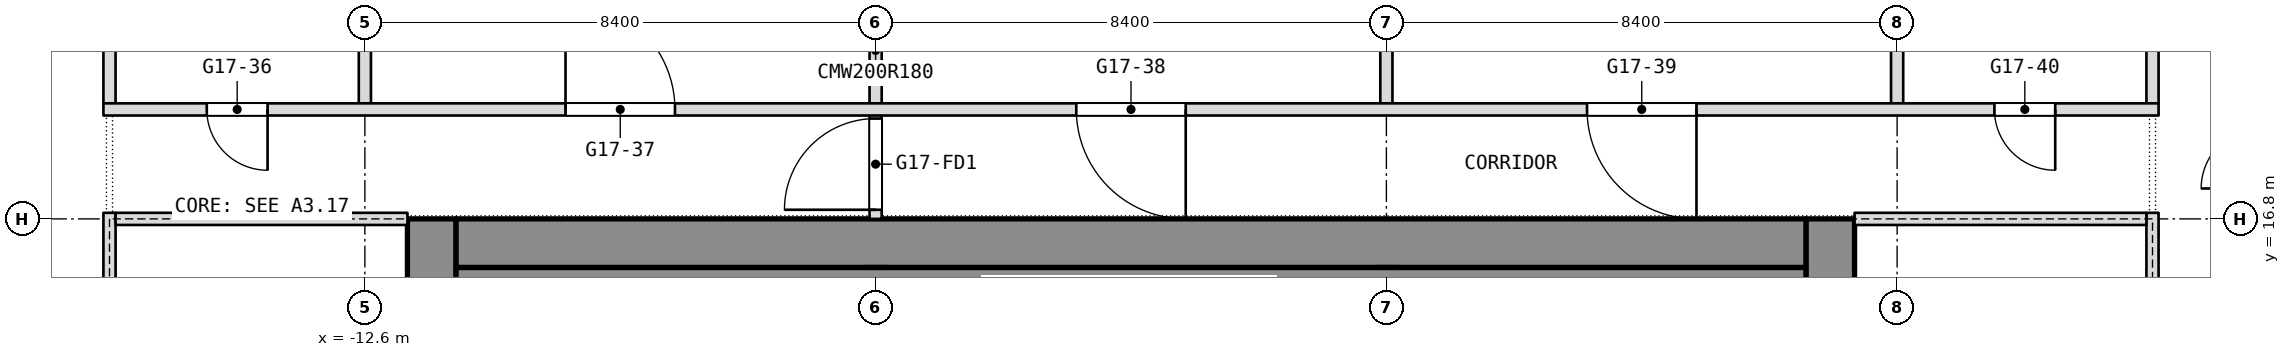
"""IFC4 building model, lengths in metres.
Left out: names, types, materials, properties, quantities, classifications, styles, units other than length and angle.
Written with IfcOpenShell. Run it as: python <this file> out.ifc"""

import sys

from ifc_helpers import new_model, si_unit, direction, frame, frame_2d, origin, place, context, subcontext, project, spatial, rectangle, extrude, element, fill, save


model = new_model("IFC4")
c1 = context("Model", 3, precision=1e-05, world=origin(), true_north=direction((0.0, 1.0)))
c2 = subcontext(c1, "Body", "Model", "MODEL_VIEW")
j1 = project(units=[si_unit("LENGTHUNIT", "METRE"), si_unit("PLANEANGLEUNIT", "RADIAN")], contexts=[c1])
p1 = place(None, origin())
s1 = spatial("IfcSite", under=j1, at=p1, CompositionType="ELEMENT")
p2 = place(p1, origin())
s2 = spatial("IfcBuilding", under=s1, at=p2, CompositionType="ELEMENT")
p3 = place(p2, frame((0.0, 0.0, 212.9)))
s3 = spatial("IfcBuildingStorey", under=s2, at=p3, CompositionType="ELEMENT", Elevation=212.9)
p4 = place(p3, frame((11.5, 0.0, 0.0), z_axis=(0.0, 0.0, 1.0), x_axis=(0.0, 1.0, 0.0)))
e1 = element("IfcWall", 1, at=p4, inside=s3, PredefinedType="SHEAR", context=c2, shape_type="SweptSolid", body=[
    extrude(rectangle(XDim=16.8, YDim=0.8, at=frame_2d((8.4, 0.0))), origin(), (0.0, 0.0, 1.0), 3.6),
])
p5 = place(p4, frame((2.3, 0.0, 0.0)))
e2 = element("IfcOpeningElement", 2, at=p5, cuts=e1, PredefinedType="OPENING", context=c2, shape_type="SweptSolid", body=[
    extrude(rectangle(XDim=1.1, YDim=2.1, at=frame_2d((0.55, 1.05))), frame((0.0, 0.4, 0.0), z_axis=(0.0, -1.0, 0.0), x_axis=(1.0, 0.0, 0.0)), (0.0, 0.0, 1.0), 0.8),
])
p6 = place(p4, frame((4.85, 0.0, 0.0)))
e3 = element("IfcOpeningElement", 3, at=p6, cuts=e1, PredefinedType="OPENING", context=c2, shape_type="SweptSolid", body=[
    extrude(rectangle(XDim=1.1, YDim=2.1, at=frame_2d((0.55, 1.05))), frame((0.0, 0.4, 0.0), z_axis=(0.0, -1.0, 0.0), x_axis=(1.0, 0.0, 0.0)), (0.0, 0.0, 1.0), 0.8),
])
p7 = place(p4, frame((6.825, 0.0, 0.0)))
e4 = element("IfcOpeningElement", 4, at=p7, cuts=e1, PredefinedType="OPENING", context=c2, shape_type="SweptSolid", body=[
    extrude(rectangle(XDim=1.2, YDim=2.1, at=frame_2d((0.6, 1.05))), frame((0.0, 0.4, 0.0), z_axis=(0.0, -1.0, 0.0), x_axis=(1.0, 0.0, 0.0)), (0.0, 0.0, 1.0), 0.8),
])
p8 = place(p4, frame((13.4, 0.0, 0.0)))
e5 = element("IfcOpeningElement", 5, at=p8, cuts=e1, PredefinedType="OPENING", context=c2, shape_type="SweptSolid", body=[
    extrude(rectangle(XDim=1.1, YDim=2.1, at=frame_2d((0.55, 1.05))), frame((0.0, 0.4, 0.0), z_axis=(0.0, -1.0, 0.0), x_axis=(1.0, 0.0, 0.0)), (0.0, 0.0, 1.0), 0.8),
])
p9 = place(p4, frame((10.85, 0.0, 0.0)))
e6 = element("IfcOpeningElement", 6, at=p9, cuts=e1, PredefinedType="OPENING", context=c2, shape_type="SweptSolid", body=[
    extrude(rectangle(XDim=1.1, YDim=2.1, at=frame_2d((0.55, 1.05))), frame((0.0, 0.4, 0.0), z_axis=(0.0, -1.0, 0.0), x_axis=(1.0, 0.0, 0.0)), (0.0, 0.0, 1.0), 0.8),
])
p10 = place(p4, frame((8.775, 0.0, 0.0)))
e7 = element("IfcOpeningElement", 7, at=p10, cuts=e1, PredefinedType="OPENING", context=c2, shape_type="SweptSolid", body=[
    extrude(rectangle(XDim=1.2, YDim=2.1, at=frame_2d((0.6, 1.05))), frame((0.0, 0.4, 0.0), z_axis=(0.0, -1.0, 0.0), x_axis=(1.0, 0.0, 0.0)), (0.0, 0.0, 1.0), 0.8),
])
p11 = place(p3, frame((-11.5, 0.0, 0.0), z_axis=(0.0, 0.0, 1.0), x_axis=(0.0, 1.0, 0.0)))
e8 = element("IfcWall", 8, at=p11, inside=s3, PredefinedType="SHEAR", context=c2, shape_type="SweptSolid", body=[
    extrude(rectangle(XDim=16.8, YDim=0.8, at=frame_2d((8.4, 0.0))), origin(), (0.0, 0.0, 1.0), 3.6),
])
p12 = place(p11, frame((1.762, 0.0, 0.0)))
e9 = element("IfcOpeningElement", 9, at=p12, cuts=e8, PredefinedType="OPENING", context=c2, shape_type="SweptSolid", body=[
    extrude(rectangle(XDim=0.9, YDim=2.1, at=frame_2d((0.45, 1.05))), frame((0.0, 0.4, 0.0), z_axis=(0.0, -1.0, 0.0), x_axis=(1.0, 0.0, 0.0)), (0.0, 0.0, 1.0), 0.8),
])
p13 = place(p11, frame((4.387, 0.0, 0.0)))
e10 = element("IfcOpeningElement", 10, at=p13, cuts=e8, PredefinedType="OPENING", context=c2, shape_type="SweptSolid", body=[
    extrude(rectangle(XDim=0.9, YDim=2.1, at=frame_2d((0.45, 1.05))), frame((0.0, 0.4, 0.0), z_axis=(0.0, -1.0, 0.0), x_axis=(1.0, 0.0, 0.0)), (0.0, 0.0, 1.0), 0.8),
])
p14 = place(p11, frame((6.825, 0.0, 0.0)))
e11 = element("IfcOpeningElement", 11, at=p14, cuts=e8, PredefinedType="OPENING", context=c2, shape_type="SweptSolid", body=[
    extrude(rectangle(XDim=1.2, YDim=2.1, at=frame_2d((0.6, 1.05))), frame((0.0, 0.4, 0.0), z_axis=(0.0, -1.0, 0.0), x_axis=(1.0, 0.0, 0.0)), (0.0, 0.0, 1.0), 0.8),
])
p15 = place(p11, frame((12.3, 0.0, 0.0)))
e12 = element("IfcOpeningElement", 12, at=p15, cuts=e8, PredefinedType="OPENING", context=c2, shape_type="SweptSolid", body=[
    extrude(rectangle(XDim=0.9, YDim=2.1, at=frame_2d((0.45, 1.05))), frame((0.0, 0.4, 0.0), z_axis=(0.0, -1.0, 0.0), x_axis=(1.0, 0.0, 0.0)), (0.0, 0.0, 1.0), 0.8),
])
p16 = place(p11, frame((8.775, 0.0, 0.0)))
e13 = element("IfcOpeningElement", 13, at=p16, cuts=e8, PredefinedType="OPENING", context=c2, shape_type="SweptSolid", body=[
    extrude(rectangle(XDim=1.2, YDim=2.1, at=frame_2d((0.6, 1.05))), frame((0.0, 0.4, 0.0), z_axis=(0.0, -1.0, 0.0), x_axis=(1.0, 0.0, 0.0)), (0.0, 0.0, 1.0), 0.8),
])
p17 = place(p3, frame((-11.1, 16.4, 0.0), z_axis=(0.0, 0.0, 1.0), x_axis=(1.0, 0.0, 0.0)))
e14 = element("IfcWall", 14, at=p17, inside=s3, PredefinedType="SHEAR", context=c2, shape_type="SweptSolid", body=[
    extrude(rectangle(XDim=22.2, YDim=0.8, at=frame_2d((11.1, 0.0))), origin(), (0.0, 0.0, 1.0), 3.6),
])
p18 = place(p3, frame((-4.2, 0.8, 0.0), z_axis=(0.0, 0.0, 1.0), x_axis=(0.0, 1.0, 0.0)))
e15 = element("IfcWall", 15, at=p18, inside=s3, PredefinedType="SHEAR", context=c2, shape_type="SweptSolid", body=[
    extrude(rectangle(XDim=15.2, YDim=0.4, at=frame_2d((7.6, 0.0))), origin(), (0.0, 0.0, 1.0), 3.6),
])
p19 = place(p18, frame((8.5, 0.0, 0.0)))
e16 = element("IfcOpeningElement", 16, at=p19, cuts=e15, PredefinedType="OPENING", context=c2, shape_type="SweptSolid", body=[
    extrude(rectangle(XDim=1.2, YDim=2.1, at=frame_2d((0.6, 1.05))), frame((0.0, 0.2, 0.0), z_axis=(0.0, -1.0, 0.0), x_axis=(1.0, 0.0, 0.0)), (0.0, 0.0, 1.0), 0.4),
])
p20 = place(p3, frame((4.2, 0.8, 0.0), z_axis=(0.0, 0.0, 1.0), x_axis=(0.0, 1.0, 0.0)))
e17 = element("IfcWall", 17, at=p20, inside=s3, PredefinedType="SHEAR", context=c2, shape_type="SweptSolid", body=[
    extrude(rectangle(XDim=15.2, YDim=0.4, at=frame_2d((7.6, 0.0))), origin(), (0.0, 0.0, 1.0), 3.6),
])
p21 = place(p20, frame((5.95, 0.0, 0.0)))
e18 = element("IfcOpeningElement", 18, at=p21, cuts=e17, PredefinedType="OPENING", context=c2, shape_type="SweptSolid", body=[
    extrude(rectangle(XDim=1.2, YDim=2.1, at=frame_2d((0.6, 1.05))), frame((0.0, 0.2, 0.0), z_axis=(0.0, -1.0, 0.0), x_axis=(1.0, 0.0, 0.0)), (0.0, 0.0, 1.0), 0.4),
])
for number, where, z_axis, x_axis in (
    (19, (16.8, 18.7, 0.0), (0.0, 0.0, 1.0), (0.0, 1.0, 0.0)),
    (20, (12.6, 18.7, 0.0), (0.0, 0.0, 1.0), (0.0, 1.0, 0.0)),
    (21, (4.2, 18.7, 0.0), (0.0, 0.0, 1.0), (0.0, 1.0, 0.0)),
):
    element("IfcWall", number, at=place(p3, frame(where, z_axis=z_axis, x_axis=x_axis)), inside=s3, PredefinedType="PARTITIONING", context=c2, shape_type="SweptSolid", body=[
        extrude(rectangle(XDim=3.64, YDim=0.2, at=frame_2d((1.82, 0.0))), origin(), (0.0, 0.0, 1.0), 3.34),
    ])
p22 = place(p3, frame((-4.2, 16.8, 0.0), z_axis=(0.0, 0.0, 1.0), x_axis=(0.0, 1.0, 0.0)))
e22 = element("IfcWall", 22, at=p22, inside=s3, PredefinedType="PARTITIONING", context=c2, shape_type="SweptSolid", body=[
    extrude(rectangle(XDim=5.54, YDim=0.2, at=frame_2d((2.77, 0.0))), origin(), (0.0, 0.0, 1.0), 3.34),
])
p23 = place(p22, frame((0.15, 0.0, 0.0)))
e23 = element("IfcOpeningElement", 23, at=p23, cuts=e22, PredefinedType="OPENING", context=c2, shape_type="SweptSolid", body=[
    extrude(rectangle(XDim=1.5, YDim=2.1, at=frame_2d((0.75, 1.05))), frame((0.0, 0.1, 0.0), z_axis=(0.0, -1.0, 0.0), x_axis=(1.0, 0.0, 0.0)), (0.0, 0.0, 1.0), 0.2),
])
for number, where, z_axis, x_axis in (
    (24, (-12.6, 18.7, 0.0), (0.0, 0.0, 1.0), (0.0, 1.0, 0.0)),
    (25, (-16.8, 18.7, 0.0), (0.0, 0.0, 1.0), (0.0, 1.0, 0.0)),
):
    element("IfcWall", number, at=place(p3, frame(where, z_axis=z_axis, x_axis=x_axis)), inside=s3, PredefinedType="PARTITIONING", context=c2, shape_type="SweptSolid", body=[
        extrude(rectangle(XDim=3.64, YDim=0.2, at=frame_2d((1.82, 0.0))), origin(), (0.0, 0.0, 1.0), 3.34),
    ])
p24 = place(p3, frame((-16.9, 18.6, 0.0), z_axis=(0.0, 0.0, 1.0), x_axis=(1.0, 0.0, 0.0)))
e26 = element("IfcWall", 26, at=p24, inside=s3, PredefinedType="PARTITIONING", context=c2, shape_type="SweptSolid", body=[
    extrude(rectangle(XDim=33.8, YDim=0.2, at=frame_2d((16.9, 0.0))), origin(), (0.0, 0.0, 1.0), 3.34),
])
p25 = place(p24, frame((1.7, 0.0, 0.0)))
e27 = element("IfcOpeningElement", 27, at=p25, cuts=e26, PredefinedType="OPENING", context=c2, shape_type="SweptSolid", body=[
    extrude(rectangle(XDim=1.0, YDim=2.1, at=frame_2d((0.5, 1.05))), frame((0.0, 0.1, 0.0), z_axis=(0.0, -1.0, 0.0), x_axis=(1.0, 0.0, 0.0)), (0.0, 0.0, 1.0), 0.2),
])
p26 = place(p24, frame((7.6, 0.0, 0.0)))
e28 = element("IfcOpeningElement", 28, at=p26, cuts=e26, PredefinedType="OPENING", context=c2, shape_type="SweptSolid", body=[
    extrude(rectangle(XDim=1.8, YDim=2.1, at=frame_2d((0.9, 1.05))), frame((0.0, 0.1, 0.0), z_axis=(0.0, -1.0, 0.0), x_axis=(1.0, 0.0, 0.0)), (0.0, 0.0, 1.0), 0.2),
])
p27 = place(p24, frame((16.0, 0.0, 0.0)))
e29 = element("IfcOpeningElement", 29, at=p27, cuts=e26, PredefinedType="OPENING", context=c2, shape_type="SweptSolid", body=[
    extrude(rectangle(XDim=1.8, YDim=2.1, at=frame_2d((0.9, 1.05))), frame((0.0, 0.1, 0.0), z_axis=(0.0, -1.0, 0.0), x_axis=(1.0, 0.0, 0.0)), (0.0, 0.0, 1.0), 0.2),
])
p28 = place(p24, frame((24.4, 0.0, 0.0)))
e30 = element("IfcOpeningElement", 30, at=p28, cuts=e26, PredefinedType="OPENING", context=c2, shape_type="SweptSolid", body=[
    extrude(rectangle(XDim=1.8, YDim=2.1, at=frame_2d((0.9, 1.05))), frame((0.0, 0.1, 0.0), z_axis=(0.0, -1.0, 0.0), x_axis=(1.0, 0.0, 0.0)), (0.0, 0.0, 1.0), 0.2),
])
p29 = place(p24, frame((31.1, 0.0, 0.0)))
e31 = element("IfcOpeningElement", 31, at=p29, cuts=e26, PredefinedType="OPENING", context=c2, shape_type="SweptSolid", body=[
    extrude(rectangle(XDim=1.0, YDim=2.1, at=frame_2d((0.5, 1.05))), frame((0.0, 0.1, 0.0), z_axis=(0.0, -1.0, 0.0), x_axis=(1.0, 0.0, 0.0)), (0.0, 0.0, 1.0), 0.2),
])
p30 = place(p3, frame((-11.1, 15.65, 0.0), z_axis=(0.0, 0.0, 1.0), x_axis=(1.0, 0.0, 0.0)))
e32 = element("IfcWall", 32, at=p30, inside=s3, PredefinedType="PARTITIONING", context=c2, shape_type="SweptSolid", body=[
    extrude(rectangle(XDim=22.2, YDim=0.7, at=frame_2d((11.1, 0.0))), origin(), (0.0, 0.0, 1.0), 3.34),
])
p31 = place(p3, frame((-16.8, -0.1, 0.0), z_axis=(0.0, 0.0, 1.0), x_axis=(0.0, 1.0, 0.0)))
e33 = element("IfcWall", 33, at=p31, inside=s3, PredefinedType="PARTITIONING", context=c2, shape_type="SweptSolid", body=[
    extrude(rectangle(XDim=17.0, YDim=0.2, at=frame_2d((8.5, 0.0))), origin(), (0.0, 0.0, 1.0), 3.34),
])
p32 = place(p31, frame((2.2, 0.0, 0.0)))
e34 = element("IfcOpeningElement", 34, at=p32, cuts=e33, PredefinedType="OPENING", context=c2, shape_type="SweptSolid", body=[
    extrude(rectangle(XDim=1.8, YDim=2.1, at=frame_2d((0.9, 1.05))), frame((0.0, 0.1, 0.0), z_axis=(0.0, -1.0, 0.0), x_axis=(1.0, 0.0, 0.0)), (0.0, 0.0, 1.0), 0.2),
])
p33 = place(p31, frame((13.0, 0.0, 0.0)))
e35 = element("IfcOpeningElement", 35, at=p33, cuts=e33, PredefinedType="OPENING", context=c2, shape_type="SweptSolid", body=[
    extrude(rectangle(XDim=1.8, YDim=2.1, at=frame_2d((0.9, 1.05))), frame((0.0, 0.1, 0.0), z_axis=(0.0, -1.0, 0.0), x_axis=(1.0, 0.0, 0.0)), (0.0, 0.0, 1.0), 0.2),
])
p34 = place(p3, frame((-16.7, 16.8, 0.0), z_axis=(0.0, 0.0, 1.0), x_axis=(1.0, 0.0, 0.0)))
e36 = element("IfcWall", 36, at=p34, inside=s3, PredefinedType="PARTITIONING", context=c2, shape_type="SweptSolid", body=[
    extrude(rectangle(XDim=4.8, YDim=0.2, at=frame_2d((2.4, 0.0))), origin(), (0.0, 0.0, 1.0), 2.94),
])
p35 = place(p3, frame((16.8, -0.1, 0.0), z_axis=(0.0, 0.0, 1.0), x_axis=(0.0, 1.0, 0.0)))
e37 = element("IfcWall", 37, at=p35, inside=s3, PredefinedType="PARTITIONING", context=c2, shape_type="SweptSolid", body=[
    extrude(rectangle(XDim=17.0, YDim=0.2, at=frame_2d((8.5, 0.0))), origin(), (0.0, 0.0, 1.0), 3.34),
])
p36 = place(p35, frame((2.2, 0.0, 0.0)))
e38 = element("IfcOpeningElement", 38, at=p36, cuts=e37, PredefinedType="OPENING", context=c2, shape_type="SweptSolid", body=[
    extrude(rectangle(XDim=1.8, YDim=2.1, at=frame_2d((0.9, 1.05))), frame((0.0, 0.1, 0.0), z_axis=(0.0, -1.0, 0.0), x_axis=(1.0, 0.0, 0.0)), (0.0, 0.0, 1.0), 0.2),
])
p37 = place(p35, frame((13.0, 0.0, 0.0)))
e39 = element("IfcOpeningElement", 39, at=p37, cuts=e37, PredefinedType="OPENING", context=c2, shape_type="SweptSolid", body=[
    extrude(rectangle(XDim=1.8, YDim=2.1, at=frame_2d((0.9, 1.05))), frame((0.0, 0.1, 0.0), z_axis=(0.0, -1.0, 0.0), x_axis=(1.0, 0.0, 0.0)), (0.0, 0.0, 1.0), 0.2),
])
p38 = place(p3, frame((11.9, 16.8, 0.0), z_axis=(0.0, 0.0, 1.0), x_axis=(1.0, 0.0, 0.0)))
e40 = element("IfcWall", 40, at=p38, inside=s3, PredefinedType="PARTITIONING", context=c2, shape_type="SweptSolid", body=[
    extrude(rectangle(XDim=4.8, YDim=0.2, at=frame_2d((2.4, 0.0))), origin(), (0.0, 0.0, 1.0), 2.94),
])
p39 = place(p25, origin())
e41 = element("IfcDoor", 41, at=p39, inside=s3, OperationType="SINGLE_SWING_RIGHT", PredefinedType="DOOR", context=c2, shape_type="SweptSolid", body=[
    extrude(rectangle(XDim=1.0, YDim=2.1, at=frame_2d((0.5, 1.05))), frame((0.0, 0.025, 0.0), z_axis=(0.0, -1.0, 0.0), x_axis=(1.0, 0.0, 0.0)), (0.0, 0.0, 1.0), 0.05),
])
fill(e27, e41)
p40 = place(p26, origin())
e42 = element("IfcDoor", 42, at=p40, inside=s3, OperationType="DOUBLE_DOOR_SINGLE_SWING", PredefinedType="DOOR", context=c2, shape_type="SweptSolid", body=[
    extrude(rectangle(XDim=1.8, YDim=2.1, at=frame_2d((0.9, 1.05))), frame((0.0, 0.025, 0.0), z_axis=(0.0, -1.0, 0.0), x_axis=(1.0, 0.0, 0.0)), (0.0, 0.0, 1.0), 0.05),
])
fill(e28, e42)
p41 = place(p27, origin())
e43 = element("IfcDoor", 43, at=p41, inside=s3, OperationType="DOUBLE_DOOR_SINGLE_SWING", PredefinedType="DOOR", context=c2, shape_type="SweptSolid", body=[
    extrude(rectangle(XDim=1.8, YDim=2.1, at=frame_2d((0.9, 1.05))), frame((0.0, 0.025, 0.0), z_axis=(0.0, -1.0, 0.0), x_axis=(1.0, 0.0, 0.0)), (0.0, 0.0, 1.0), 0.05),
])
fill(e29, e43)
p42 = place(p28, origin())
e44 = element("IfcDoor", 44, at=p42, inside=s3, OperationType="DOUBLE_DOOR_SINGLE_SWING", PredefinedType="DOOR", context=c2, shape_type="SweptSolid", body=[
    extrude(rectangle(XDim=1.8, YDim=2.1, at=frame_2d((0.9, 1.05))), frame((0.0, 0.025, 0.0), z_axis=(0.0, -1.0, 0.0), x_axis=(1.0, 0.0, 0.0)), (0.0, 0.0, 1.0), 0.05),
])
fill(e30, e44)
p43 = place(p29, origin())
e45 = element("IfcDoor", 45, at=p43, inside=s3, OperationType="SINGLE_SWING_RIGHT", PredefinedType="DOOR", context=c2, shape_type="SweptSolid", body=[
    extrude(rectangle(XDim=1.0, YDim=2.1, at=frame_2d((0.5, 1.05))), frame((0.0, 0.025, 0.0), z_axis=(0.0, -1.0, 0.0), x_axis=(1.0, 0.0, 0.0)), (0.0, 0.0, 1.0), 0.05),
])
fill(e31, e45)
p44 = place(p23, origin())
e46 = element("IfcDoor", 46, at=p44, inside=s3, OperationType="DOUBLE_DOOR_DOUBLE_SWING", PredefinedType="DOOR", context=c2, shape_type="SweptSolid", body=[
    extrude(rectangle(XDim=1.5, YDim=2.1, at=frame_2d((0.75, 1.05))), frame((0.0, 0.025, 0.0), z_axis=(0.0, -1.0, 0.0), x_axis=(1.0, 0.0, 0.0)), (0.0, 0.0, 1.0), 0.05),
])
fill(e23, e46)
save(model, sys.argv[1])
